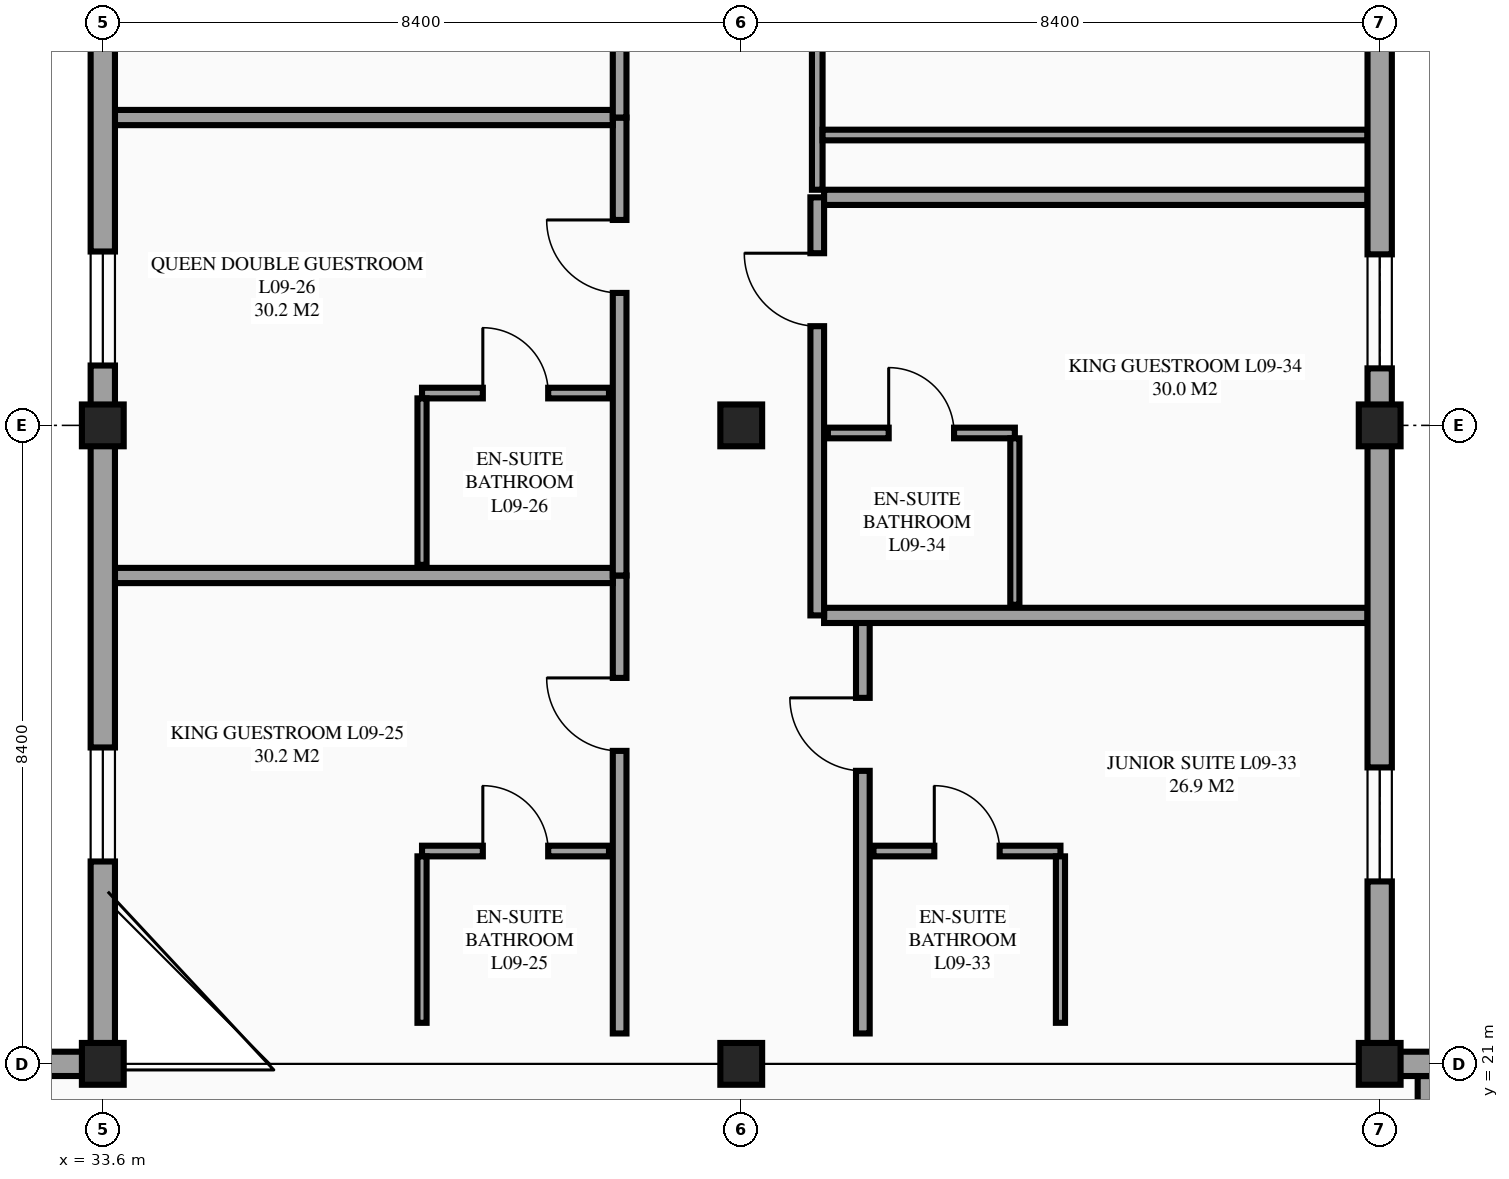
"""IFC4 building model, lengths in metres.
Left out: names, types, materials, properties, quantities, classifications, styles, units other than length and angle.
Written with IfcOpenShell. Run it as: python <this file> out.ifc"""

import sys

from ifc_helpers import new_model, si_unit, direction, frame, frame_2d, origin, origin_2d, place, context, subcontext, project, spatial, rectangle, extrude, element, fill, save


model = new_model("IFC4")
c1 = context("Model", 3, precision=1e-05, world=origin(), true_north=direction((0.0, 1.0)))
c2 = subcontext(c1, "Body", "Model", "MODEL_VIEW")
j1 = project(units=[si_unit("LENGTHUNIT", "METRE"), si_unit("PLANEANGLEUNIT", "RADIAN")], contexts=[c1])
p1 = place(None, origin())
s1 = spatial("IfcSite", under=j1, at=p1, CompositionType="ELEMENT")
p2 = place(p1, origin())
s2 = spatial("IfcBuilding", under=s1, at=p2, CompositionType="ELEMENT")
p3 = place(p2, frame((0.0, 0.0, 36.3)))
s3 = spatial("IfcBuildingStorey", under=s2, at=p3, CompositionType="ELEMENT", Elevation=36.3)
for number, where, z_axis, x_axis in (
    (1, (33.6, 21.0, 0.0), (0.0, 0.0, 1.0), (1.0, 0.0, 0.0)),
    (2, (33.6, 29.4, 0.0), (0.0, 0.0, 1.0), (1.0, 0.0, 0.0)),
    (3, (42.0, 21.0, 0.0), (0.0, 0.0, 1.0), (1.0, 0.0, 0.0)),
    (4, (42.0, 29.4, 0.0), (0.0, 0.0, 1.0), (1.0, 0.0, 0.0)),
    (5, (50.4, 21.0, 0.0), (0.0, 0.0, 1.0), (1.0, 0.0, 0.0)),
    (6, (50.4, 29.4, 0.0), (0.0, 0.0, 1.0), (1.0, 0.0, 0.0)),
):
    element("IfcColumn", number, at=place(p3, frame(where, z_axis=z_axis, x_axis=x_axis)), inside=s3, PredefinedType="COLUMN", context=c2, shape_type="SweptSolid", body=[
        extrude(rectangle(XDim=0.55, YDim=0.55, at=origin_2d()), origin(), (0.0, 0.0, 1.0), 3.6),
    ])
p4 = place(p3, frame((33.6, 21.0, 0.0), z_axis=(0.0, 0.0, 1.0), x_axis=(-1.0, 0.0, 0.0)))
e7 = element("IfcWall", 7, at=p4, inside=s3, PredefinedType="STANDARD", context=c2, shape_type="SweptSolid", body=[
    extrude(rectangle(XDim=2.0, YDim=0.32, at=frame_2d((1.0, 0.0))), origin(), (0.0, 0.0, 1.0), 2.48),
])
p5 = place(p3, frame((40.4, 21.4, 0.0), z_axis=(0.0, 0.0, 1.0), x_axis=(0.0, 1.0, 0.0)))
e8 = element("IfcWall", 8, at=p5, inside=s3, PredefinedType="PARTITIONING", context=c2, shape_type="SweptSolid", body=[
    extrude(rectangle(XDim=6.025, YDim=0.18, at=frame_2d((3.013, 0.0))), origin(), (0.0, 0.0, 1.0), 3.375),
])
p6 = place(p5, frame((3.718, 0.0, 0.0)))
e9 = element("IfcOpeningElement", 9, at=p6, cuts=e8, PredefinedType="OPENING", context=c2, shape_type="SweptSolid", body=[
    extrude(rectangle(XDim=0.96, YDim=2.15, at=frame_2d((0.48, 1.075))), frame((0.0, 0.1, 0.0), z_axis=(0.0, -1.0, 0.0), x_axis=(1.0, 0.0, 0.0)), (0.0, 0.0, 1.0), 0.2),
])
p7 = place(p3, frame((33.76, 27.425, 0.0), z_axis=(0.0, 0.0, 1.0), x_axis=(1.0, 0.0, 0.0)))
e10 = element("IfcWall", 10, at=p7, inside=s3, PredefinedType="PARTITIONING", context=c2, shape_type="SweptSolid", body=[
    extrude(rectangle(XDim=6.55, YDim=0.2, at=frame_2d((3.275, 0.0))), origin(), (0.0, 0.0, 1.0), 3.375),
])
p8 = place(p3, frame((37.8, 23.8, 0.0), z_axis=(0.0, 0.0, 1.0), x_axis=(1.0, 0.0, 0.0)))
e11 = element("IfcWall", 11, at=p8, inside=s3, PredefinedType="PARTITIONING", context=c2, shape_type="SweptSolid", body=[
    extrude(rectangle(XDim=2.46, YDim=0.14, at=frame_2d((1.23, 0.0))), origin(), (0.0, 0.0, 1.0), 3.375),
])
p9 = place(p8, frame((0.8, 0.0, 0.0)))
e12 = element("IfcOpeningElement", 12, at=p9, cuts=e11, PredefinedType="OPENING", context=c2, shape_type="SweptSolid", body=[
    extrude(rectangle(XDim=0.86, YDim=2.1, at=frame_2d((0.43, 1.05))), frame((0.0, 0.08, 0.0), z_axis=(0.0, -1.0, 0.0), x_axis=(1.0, 0.0, 0.0)), (0.0, 0.0, 1.0), 0.16),
])
p10 = place(p3, frame((37.8, 21.54, 0.0), z_axis=(0.0, 0.0, 1.0), x_axis=(0.0, 1.0, 0.0)))
e13 = element("IfcWall", 13, at=p10, inside=s3, PredefinedType="PARTITIONING", context=c2, shape_type="SweptSolid", body=[
    extrude(rectangle(XDim=2.19, YDim=0.12, at=frame_2d((1.095, 0.0))), origin(), (0.0, 0.0, 1.0), 3.375),
])
p11 = place(p3, frame((40.4, 27.425, 0.0), z_axis=(0.0, 0.0, 1.0), x_axis=(0.0, 1.0, 0.0)))
e14 = element("IfcWall", 14, at=p11, inside=s3, PredefinedType="PARTITIONING", context=c2, shape_type="SweptSolid", body=[
    extrude(rectangle(XDim=6.025, YDim=0.18, at=frame_2d((3.012, 0.0))), origin(), (0.0, 0.0, 1.0), 3.375),
])
p12 = place(p11, frame((3.718, 0.0, 0.0)))
e15 = element("IfcOpeningElement", 15, at=p12, cuts=e14, PredefinedType="OPENING", context=c2, shape_type="SweptSolid", body=[
    extrude(rectangle(XDim=0.96, YDim=2.15, at=frame_2d((0.48, 1.075))), frame((0.0, 0.1, 0.0), z_axis=(0.0, -1.0, 0.0), x_axis=(1.0, 0.0, 0.0)), (0.0, 0.0, 1.0), 0.2),
])
p13 = place(p3, frame((33.76, 33.45, 0.0), z_axis=(0.0, 0.0, 1.0), x_axis=(1.0, 0.0, 0.0)))
e16 = element("IfcWall", 16, at=p13, inside=s3, PredefinedType="PARTITIONING", context=c2, shape_type="SweptSolid", body=[
    extrude(rectangle(XDim=6.55, YDim=0.2, at=frame_2d((3.275, 0.0))), origin(), (0.0, 0.0, 1.0), 2.73),
])
p14 = place(p3, frame((37.8, 29.825, 0.0), z_axis=(0.0, 0.0, 1.0), x_axis=(1.0, 0.0, 0.0)))
e17 = element("IfcWall", 17, at=p14, inside=s3, PredefinedType="PARTITIONING", context=c2, shape_type="SweptSolid", body=[
    extrude(rectangle(XDim=2.46, YDim=0.14, at=frame_2d((1.23, 0.0))), origin(), (0.0, 0.0, 1.0), 3.375),
])
p15 = place(p14, frame((0.8, 0.0, 0.0)))
e18 = element("IfcOpeningElement", 18, at=p15, cuts=e17, PredefinedType="OPENING", context=c2, shape_type="SweptSolid", body=[
    extrude(rectangle(XDim=0.86, YDim=2.1, at=frame_2d((0.43, 1.05))), frame((0.0, 0.08, 0.0), z_axis=(0.0, -1.0, 0.0), x_axis=(1.0, 0.0, 0.0)), (0.0, 0.0, 1.0), 0.16),
])
p16 = place(p3, frame((37.8, 27.565, 0.0), z_axis=(0.0, 0.0, 1.0), x_axis=(0.0, 1.0, 0.0)))
e19 = element("IfcWall", 19, at=p16, inside=s3, PredefinedType="PARTITIONING", context=c2, shape_type="SweptSolid", body=[
    extrude(rectangle(XDim=2.19, YDim=0.12, at=frame_2d((1.095, 0.0))), origin(), (0.0, 0.0, 1.0), 3.375),
])
p17 = place(p3, frame((40.4, 33.45, 0.0), z_axis=(0.0, 0.0, 1.0), x_axis=(0.0, 1.0, 0.0)))
e20 = element("IfcWall", 20, at=p17, inside=s3, PredefinedType="PARTITIONING", context=c2, shape_type="SweptSolid", body=[
    extrude(rectangle(XDim=6.025, YDim=0.18, at=frame_2d((3.013, 0.0))), origin(), (0.0, 0.0, 1.0), 3.375),
])
p18 = place(p17, frame((1.347, 0.0, 0.0)))
e21 = element("IfcOpeningElement", 21, at=p18, cuts=e20, PredefinedType="OPENING", context=c2, shape_type="SweptSolid", body=[
    extrude(rectangle(XDim=0.96, YDim=2.15, at=frame_2d((0.48, 1.075))), frame((0.0, 0.1, 0.0), z_axis=(0.0, -1.0, 0.0), x_axis=(1.0, 0.0, 0.0)), (0.0, 0.0, 1.0), 0.2),
])
p19 = place(p3, frame((43.6, 21.4, 0.0), z_axis=(0.0, 0.0, 1.0), x_axis=(0.0, 1.0, 0.0)))
e22 = element("IfcWall", 22, at=p19, inside=s3, PredefinedType="PARTITIONING", context=c2, shape_type="SweptSolid", body=[
    extrude(rectangle(XDim=5.5, YDim=0.18, at=frame_2d((2.75, 0.0))), origin(), (0.0, 0.0, 1.0), 3.375),
])
p20 = place(p19, frame((3.455, 0.0, 0.0)))
e23 = element("IfcOpeningElement", 23, at=p20, cuts=e22, PredefinedType="OPENING", context=c2, shape_type="SweptSolid", body=[
    extrude(rectangle(XDim=0.96, YDim=2.15, at=frame_2d((0.48, 1.075))), frame((0.0, 0.1, 0.0), z_axis=(0.0, -1.0, 0.0), x_axis=(1.0, 0.0, 0.0)), (0.0, 0.0, 1.0), 0.2),
])
p21 = place(p3, frame((43.09, 26.9, 0.0), z_axis=(0.0, 0.0, 1.0), x_axis=(1.0, 0.0, 0.0)))
e24 = element("IfcWall", 24, at=p21, inside=s3, PredefinedType="PARTITIONING", context=c2, shape_type="SweptSolid", body=[
    extrude(rectangle(XDim=7.15, YDim=0.2, at=frame_2d((3.575, 0.0))), origin(), (0.0, 0.0, 1.0), 3.375),
])
p22 = place(p3, frame((43.74, 23.8, 0.0), z_axis=(0.0, 0.0, 1.0), x_axis=(1.0, 0.0, 0.0)))
e25 = element("IfcWall", 25, at=p22, inside=s3, PredefinedType="PARTITIONING", context=c2, shape_type="SweptSolid", body=[
    extrude(rectangle(XDim=2.46, YDim=0.14, at=frame_2d((1.23, 0.0))), origin(), (0.0, 0.0, 1.0), 3.375),
])
p23 = place(p22, frame((0.8, 0.0, 0.0)))
e26 = element("IfcOpeningElement", 26, at=p23, cuts=e25, PredefinedType="OPENING", context=c2, shape_type="SweptSolid", body=[
    extrude(rectangle(XDim=0.86, YDim=2.1, at=frame_2d((0.43, 1.05))), frame((0.0, 0.08, 0.0), z_axis=(0.0, -1.0, 0.0), x_axis=(1.0, 0.0, 0.0)), (0.0, 0.0, 1.0), 0.16),
])
p24 = place(p3, frame((46.2, 21.54, 0.0), z_axis=(0.0, 0.0, 1.0), x_axis=(0.0, 1.0, 0.0)))
e27 = element("IfcWall", 27, at=p24, inside=s3, PredefinedType="PARTITIONING", context=c2, shape_type="SweptSolid", body=[
    extrude(rectangle(XDim=2.19, YDim=0.12, at=frame_2d((1.095, 0.0))), origin(), (0.0, 0.0, 1.0), 3.375),
])
p25 = place(p3, frame((43.0, 26.9, 0.0), z_axis=(0.0, 0.0, 1.0), x_axis=(0.0, 1.0, 0.0)))
e28 = element("IfcWall", 28, at=p25, inside=s3, PredefinedType="PARTITIONING", context=c2, shape_type="SweptSolid", body=[
    extrude(rectangle(XDim=5.5, YDim=0.18, at=frame_2d((2.75, 0.0))), origin(), (0.0, 0.0, 1.0), 3.375),
])
p26 = place(p25, frame((3.805, 0.0, 0.0)))
e29 = element("IfcOpeningElement", 29, at=p26, cuts=e28, PredefinedType="OPENING", context=c2, shape_type="SweptSolid", body=[
    extrude(rectangle(XDim=0.96, YDim=2.15, at=frame_2d((0.48, 1.075))), frame((0.0, 0.1, 0.0), z_axis=(0.0, -1.0, 0.0), x_axis=(1.0, 0.0, 0.0)), (0.0, 0.0, 1.0), 0.2),
])
p27 = place(p3, frame((43.09, 32.4, 0.0), z_axis=(0.0, 0.0, 1.0), x_axis=(1.0, 0.0, 0.0)))
e30 = element("IfcWall", 30, at=p27, inside=s3, PredefinedType="PARTITIONING", context=c2, shape_type="SweptSolid", body=[
    extrude(rectangle(XDim=7.15, YDim=0.2, at=frame_2d((3.575, 0.0))), origin(), (0.0, 0.0, 1.0), 3.375),
])
p28 = place(p3, frame((43.14, 29.3, 0.0), z_axis=(0.0, 0.0, 1.0), x_axis=(1.0, 0.0, 0.0)))
e31 = element("IfcWall", 31, at=p28, inside=s3, PredefinedType="PARTITIONING", context=c2, shape_type="SweptSolid", body=[
    extrude(rectangle(XDim=2.46, YDim=0.14, at=frame_2d((1.23, 0.0))), origin(), (0.0, 0.0, 1.0), 2.63),
])
p29 = place(p28, frame((0.8, 0.0, 0.0)))
e32 = element("IfcOpeningElement", 32, at=p29, cuts=e31, PredefinedType="OPENING", context=c2, shape_type="SweptSolid", body=[
    extrude(rectangle(XDim=0.86, YDim=2.1, at=frame_2d((0.43, 1.05))), frame((0.0, 0.08, 0.0), z_axis=(0.0, -1.0, 0.0), x_axis=(1.0, 0.0, 0.0)), (0.0, 0.0, 1.0), 0.16),
])
p30 = place(p3, frame((45.6, 27.04, 0.0), z_axis=(0.0, 0.0, 1.0), x_axis=(0.0, 1.0, 0.0)))
e33 = element("IfcWall", 33, at=p30, inside=s3, PredefinedType="PARTITIONING", context=c2, shape_type="SweptSolid", body=[
    extrude(rectangle(XDim=2.19, YDim=0.12, at=frame_2d((1.095, 0.0))), origin(), (0.0, 0.0, 1.0), 3.375),
])
p31 = place(p3, frame((51.02, 14.74, 0.0), z_axis=(0.0, 0.0, 1.0), x_axis=(0.0, 1.0, 0.0)))
e34 = element("IfcWall", 34, at=p31, inside=s3, PredefinedType="PARTITIONING", context=c2, shape_type="SweptSolid", body=[
    extrude(rectangle(XDim=6.1, YDim=0.24, at=frame_2d((3.05, 0.0))), origin(), (0.0, 0.0, 1.0), 3.375),
])
p32 = place(p3, frame((43.0, 32.5, 0.0), z_axis=(0.0, 0.0, 1.0), x_axis=(0.0, 1.0, 0.0)))
e35 = element("IfcWall", 35, at=p32, inside=s3, PredefinedType="PARTITIONING", context=c2, shape_type="SweptSolid", body=[
    extrude(rectangle(XDim=4.8, YDim=0.14, at=frame_2d((2.4, 0.0))), origin(), (0.0, 0.0, 1.0), 3.375),
])
p33 = place(p32, frame((2.05, 0.0, 0.0)))
e36 = element("IfcOpeningElement", 36, at=p33, cuts=e35, PredefinedType="OPENING", context=c2, shape_type="SweptSolid", body=[
    extrude(rectangle(XDim=0.9, YDim=2.12, at=frame_2d((0.45, 1.06))), frame((0.0, 0.08, 0.0), z_axis=(0.0, -1.0, 0.0), x_axis=(1.0, 0.0, 0.0)), (0.0, 0.0, 1.0), 0.16),
])
p34 = place(p3, frame((43.07, 33.22, 0.0), z_axis=(0.0, 0.0, 1.0), x_axis=(1.0, 0.0, 0.0)))
e37 = element("IfcWall", 37, at=p34, inside=s3, PredefinedType="PARTITIONING", context=c2, shape_type="SweptSolid", body=[
    extrude(rectangle(XDim=7.17, YDim=0.14, at=frame_2d((3.585, 0.0))), origin(), (0.0, 0.0, 1.0), 3.375),
])
p35 = place(p3, frame((58.8, 21.0, 0.0), z_axis=(0.0, 0.0, 1.0), x_axis=(-1.0, 0.0, 0.0)))
e38 = element("IfcWall", 38, at=p35, inside=s3, PredefinedType="STANDARD", context=c2, shape_type="SweptSolid", body=[
    extrude(rectangle(XDim=8.4, YDim=0.32, at=frame_2d((4.2, 0.0))), origin(), (0.0, 0.0, 1.0), 2.63),
])
p36 = place(p35, frame((3.3, 0.0, 0.75)))
e39 = element("IfcOpeningElement", 39, at=p36, cuts=e38, PredefinedType="OPENING", context=c2, shape_type="SweptSolid", body=[
    extrude(rectangle(XDim=1.8, YDim=1.5, at=frame_2d((0.9, 0.75))), frame((0.0, 0.17, 0.0), z_axis=(0.0, -1.0, 0.0), x_axis=(1.0, 0.0, 0.0)), (0.0, 0.0, 1.0), 0.34),
])
p37 = place(p3, frame((50.4, 21.0, 0.0), z_axis=(0.0, 0.0, 1.0), x_axis=(0.0, 1.0, 0.0)))
e40 = element("IfcWall", 40, at=p37, inside=s3, PredefinedType="STANDARD", context=c2, shape_type="SweptSolid", body=[
    extrude(rectangle(XDim=16.8, YDim=0.32, at=frame_2d((8.4, 0.0))), origin(), (0.0, 0.0, 1.0), 2.78),
])
p38 = place(p37, frame((2.4, 0.0, 0.85)))
e41 = element("IfcOpeningElement", 41, at=p38, cuts=e40, PredefinedType="OPENING", context=c2, shape_type="SweptSolid", body=[
    extrude(rectangle(XDim=1.5, YDim=1.5, at=frame_2d((0.75, 0.75))), frame((0.0, 0.17, 0.0), z_axis=(0.0, -1.0, 0.0), x_axis=(1.0, 0.0, 0.0)), (0.0, 0.0, 1.0), 0.34),
])
p39 = place(p37, frame((9.15, 0.0, 0.85)))
e42 = element("IfcOpeningElement", 42, at=p39, cuts=e40, PredefinedType="OPENING", context=c2, shape_type="SweptSolid", body=[
    extrude(rectangle(XDim=1.5, YDim=1.5, at=frame_2d((0.75, 0.75))), frame((0.0, 0.17, 0.0), z_axis=(0.0, -1.0, 0.0), x_axis=(1.0, 0.0, 0.0)), (0.0, 0.0, 1.0), 0.34),
])
p40 = place(p3, frame((33.6, 37.8, 0.0), z_axis=(0.0, 0.0, 1.0), x_axis=(0.0, -1.0, 0.0)))
e43 = element("IfcWall", 43, at=p40, inside=s3, PredefinedType="STANDARD", context=c2, shape_type="SweptSolid", body=[
    extrude(rectangle(XDim=8.4, YDim=0.32, at=frame_2d((4.2, 0.0))), origin(), (0.0, 0.0, 1.0), 3.126),
])
p41 = place(p40, frame((6.113, 0.0, 0.85)))
e44 = element("IfcOpeningElement", 44, at=p41, cuts=e43, PredefinedType="OPENING", context=c2, shape_type="SweptSolid", body=[
    extrude(rectangle(XDim=1.5, YDim=1.5, at=frame_2d((0.75, 0.75))), frame((0.0, 0.17, 0.0), z_axis=(0.0, -1.0, 0.0), x_axis=(1.0, 0.0, 0.0)), (0.0, 0.0, 1.0), 0.34),
])
p42 = place(p40, frame((0.837, 0.0, 0.85)))
e45 = element("IfcOpeningElement", 45, at=p42, cuts=e43, PredefinedType="OPENING", context=c2, shape_type="SweptSolid", body=[
    extrude(rectangle(XDim=1.5, YDim=1.5, at=frame_2d((0.75, 0.75))), frame((0.0, 0.17, 0.0), z_axis=(0.0, -1.0, 0.0), x_axis=(1.0, 0.0, 0.0)), (0.0, 0.0, 1.0), 0.34),
])
p43 = place(p3, frame((33.6, 29.4, 0.0), z_axis=(0.0, 0.0, 1.0), x_axis=(0.0, -1.0, 0.0)))
e46 = element("IfcWall", 46, at=p43, inside=s3, PredefinedType="STANDARD", context=c2, shape_type="SweptSolid", body=[
    extrude(rectangle(XDim=8.4, YDim=0.32, at=frame_2d((4.2, 0.0))), origin(), (0.0, 0.0, 1.0), 2.58),
])
p44 = place(p43, frame((4.238, 0.0, 0.85)))
e47 = element("IfcOpeningElement", 47, at=p44, cuts=e46, PredefinedType="OPENING", context=c2, shape_type="SweptSolid", body=[
    extrude(rectangle(XDim=1.5, YDim=1.5, at=frame_2d((0.75, 0.75))), frame((0.0, 0.17, 0.0), z_axis=(0.0, -1.0, 0.0), x_axis=(1.0, 0.0, 0.0)), (0.0, 0.0, 1.0), 0.34),
])
p45 = place(p44, origin())
e48 = element("IfcWindow", 48, at=p45, inside=s3, PartitioningType="SINGLE_PANEL", PredefinedType="WINDOW", context=c2, shape_type="SweptSolid", body=[
    extrude(rectangle(XDim=1.5, YDim=1.5, at=frame_2d((0.75, 0.75))), frame((0.0, 0.03, 0.0), z_axis=(0.0, -1.0, 0.0), x_axis=(1.0, 0.0, 0.0)), (0.0, 0.0, 1.0), 0.06),
])
fill(e47, e48)
p46 = place(p41, origin())
e49 = element("IfcWindow", 49, at=p46, inside=s3, PartitioningType="SINGLE_PANEL", PredefinedType="WINDOW", context=c2, shape_type="SweptSolid", body=[
    extrude(rectangle(XDim=1.5, YDim=1.5, at=frame_2d((0.75, 0.75))), frame((0.0, 0.03, 0.0), z_axis=(0.0, -1.0, 0.0), x_axis=(1.0, 0.0, 0.0)), (0.0, 0.0, 1.0), 0.06),
])
fill(e44, e49)
p47 = place(p38, origin())
e50 = element("IfcWindow", 50, at=p47, inside=s3, PartitioningType="SINGLE_PANEL", PredefinedType="WINDOW", context=c2, shape_type="SweptSolid", body=[
    extrude(rectangle(XDim=1.5, YDim=1.5, at=frame_2d((0.75, 0.75))), frame((0.0, 0.03, 0.0), z_axis=(0.0, -1.0, 0.0), x_axis=(1.0, 0.0, 0.0)), (0.0, 0.0, 1.0), 0.06),
])
fill(e41, e50)
p48 = place(p39, origin())
e51 = element("IfcWindow", 51, at=p48, inside=s3, PartitioningType="SINGLE_PANEL", PredefinedType="WINDOW", context=c2, shape_type="SweptSolid", body=[
    extrude(rectangle(XDim=1.5, YDim=1.5, at=frame_2d((0.75, 0.75))), frame((0.0, 0.03, 0.0), z_axis=(0.0, -1.0, 0.0), x_axis=(1.0, 0.0, 0.0)), (0.0, 0.0, 1.0), 0.06),
])
fill(e42, e51)
p49 = place(p6, origin())
e52 = element("IfcDoor", 52, at=p49, inside=s3, OperationType="SINGLE_SWING_RIGHT", PredefinedType="DOOR", context=c2, shape_type="SweptSolid", body=[
    extrude(rectangle(XDim=0.96, YDim=2.15, at=frame_2d((0.48, 1.075))), frame((0.0, 0.025, 0.0), z_axis=(0.0, -1.0, 0.0), x_axis=(1.0, 0.0, 0.0)), (0.0, 0.0, 1.0), 0.05),
])
fill(e9, e52)
p50 = place(p9, origin())
e53 = element("IfcDoor", 53, at=p50, inside=s3, OperationType="SINGLE_SWING_LEFT", PredefinedType="DOOR", context=c2, shape_type="SweptSolid", body=[
    extrude(rectangle(XDim=0.86, YDim=2.1, at=frame_2d((0.43, 1.05))), frame((0.0, 0.025, 0.0), z_axis=(0.0, -1.0, 0.0), x_axis=(1.0, 0.0, 0.0)), (0.0, 0.0, 1.0), 0.05),
])
fill(e12, e53)
p51 = place(p12, origin())
e54 = element("IfcDoor", 54, at=p51, inside=s3, OperationType="SINGLE_SWING_RIGHT", PredefinedType="DOOR", context=c2, shape_type="SweptSolid", body=[
    extrude(rectangle(XDim=0.96, YDim=2.15, at=frame_2d((0.48, 1.075))), frame((0.0, 0.025, 0.0), z_axis=(0.0, -1.0, 0.0), x_axis=(1.0, 0.0, 0.0)), (0.0, 0.0, 1.0), 0.05),
])
fill(e15, e54)
p52 = place(p15, origin())
e55 = element("IfcDoor", 55, at=p52, inside=s3, OperationType="SINGLE_SWING_LEFT", PredefinedType="DOOR", context=c2, shape_type="SweptSolid", body=[
    extrude(rectangle(XDim=0.86, YDim=2.1, at=frame_2d((0.43, 1.05))), frame((0.0, 0.025, 0.0), z_axis=(0.0, -1.0, 0.0), x_axis=(1.0, 0.0, 0.0)), (0.0, 0.0, 1.0), 0.05),
])
fill(e18, e55)
p53 = place(p20, origin())
e56 = element("IfcDoor", 56, at=p53, inside=s3, OperationType="SINGLE_SWING_RIGHT", PredefinedType="DOOR", context=c2, shape_type="SweptSolid", body=[
    extrude(rectangle(XDim=0.96, YDim=2.15, at=frame_2d((0.48, 1.075))), frame((0.0, 0.025, 0.0), z_axis=(0.0, -1.0, 0.0), x_axis=(1.0, 0.0, 0.0)), (0.0, 0.0, 1.0), 0.05),
])
fill(e23, e56)
p54 = place(p23, origin())
e57 = element("IfcDoor", 57, at=p54, inside=s3, OperationType="SINGLE_SWING_LEFT", PredefinedType="DOOR", context=c2, shape_type="SweptSolid", body=[
    extrude(rectangle(XDim=0.86, YDim=2.1, at=frame_2d((0.43, 1.05))), frame((0.0, 0.025, 0.0), z_axis=(0.0, -1.0, 0.0), x_axis=(1.0, 0.0, 0.0)), (0.0, 0.0, 1.0), 0.05),
])
fill(e26, e57)
p55 = place(p26, origin())
e58 = element("IfcDoor", 58, at=p55, inside=s3, OperationType="SINGLE_SWING_RIGHT", PredefinedType="DOOR", context=c2, shape_type="SweptSolid", body=[
    extrude(rectangle(XDim=0.96, YDim=2.15, at=frame_2d((0.48, 1.075))), frame((0.0, 0.025, 0.0), z_axis=(0.0, -1.0, 0.0), x_axis=(1.0, 0.0, 0.0)), (0.0, 0.0, 1.0), 0.05),
])
fill(e29, e58)
p56 = place(p29, origin())
e59 = element("IfcDoor", 59, at=p56, inside=s3, OperationType="SINGLE_SWING_LEFT", PredefinedType="DOOR", context=c2, shape_type="SweptSolid", body=[
    extrude(rectangle(XDim=0.86, YDim=2.1, at=frame_2d((0.43, 1.05))), frame((0.0, 0.025, 0.0), z_axis=(0.0, -1.0, 0.0), x_axis=(1.0, 0.0, 0.0)), (0.0, 0.0, 1.0), 0.05),
])
fill(e32, e59)
save(model, sys.argv[1])
